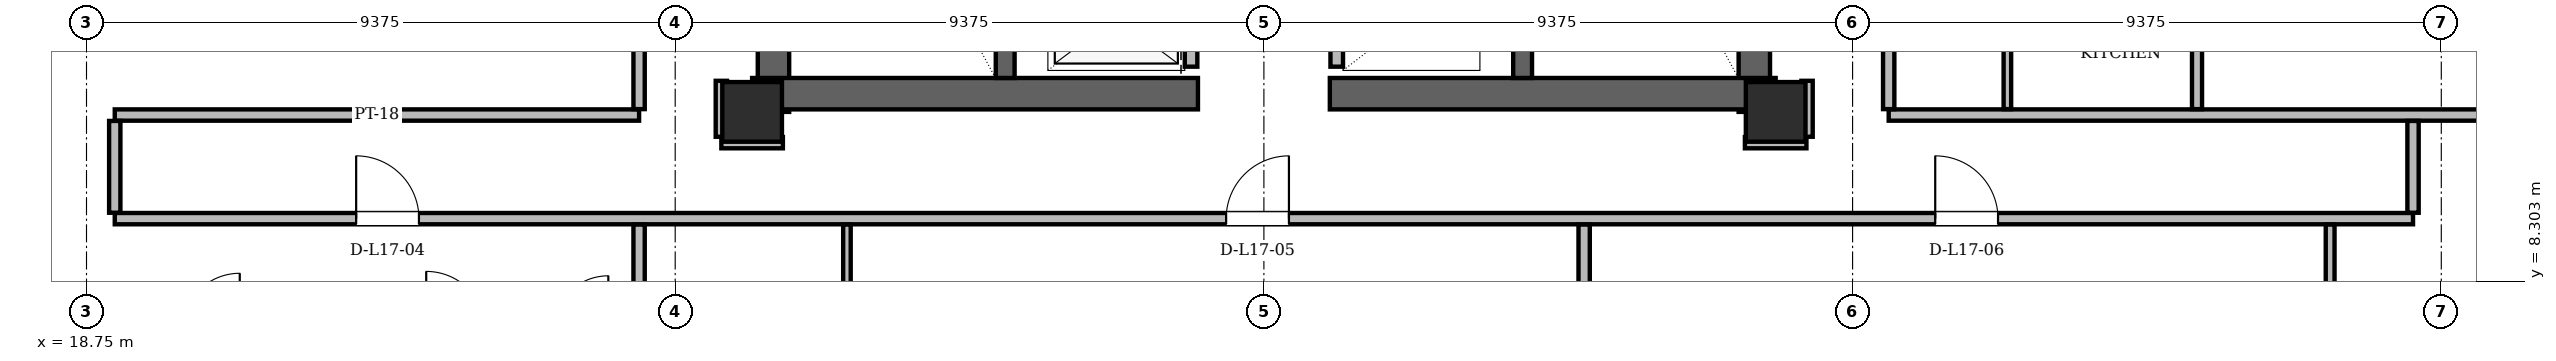
"""IFC4 building model, lengths in metres.
Left out: names, types, materials, properties, quantities, classifications, styles, units other than length and angle.
Written with IfcOpenShell. Run it as: python <this file> out.ifc"""

import sys

from ifc_helpers import new_model, si_unit, direction, frame, frame_2d, origin, origin_2d, place, context, subcontext, project, spatial, rectangle, hollow_rectangle, extrude, element, fill, save


model = new_model("IFC4")
c1 = context("Model", 3, precision=1e-05, world=origin(), true_north=direction((0.0, 1.0)))
c2 = subcontext(c1, "Body", "Model", "MODEL_VIEW")
j1 = project(units=[si_unit("LENGTHUNIT", "METRE"), si_unit("PLANEANGLEUNIT", "RADIAN")], contexts=[c1])
p1 = place(None, origin())
s1 = spatial("IfcSite", under=j1, at=p1, CompositionType="ELEMENT")
p2 = place(p1, origin())
s2 = spatial("IfcBuilding", under=s1, at=p2, CompositionType="ELEMENT")
p3 = place(p2, frame((0.0, 0.0, 66.9)))
s3 = spatial("IfcBuildingStorey", under=s2, at=p3, CompositionType="ELEMENT", Elevation=66.9)
for number, where, z_axis, x_axis in (
    (1, (29.35, 11.0, 0.0), (0.0, 0.0, 1.0), (1.0, 0.0, 0.0)),
    (2, (45.65, 11.0, 0.0), (0.0, 0.0, 1.0), (1.0, 0.0, 0.0)),
):
    element("IfcColumn", number, at=place(p3, frame(where, z_axis=z_axis, x_axis=x_axis)), inside=s3, PredefinedType="COLUMN", context=c2, shape_type="SweptSolid", body=[
        extrude(hollow_rectangle(XDim=0.95, YDim=0.95, WallThickness=0.08, at=origin_2d()), origin(), (0.0, 0.0, 1.0), 3.6),
    ])
for number, where, z_axis, x_axis in (
    (3, (29.69, 11.0, 0.0), (0.0, 0.0, 1.0), (0.0, 1.0, 0.0)),
    (4, (45.31, 11.0, 0.0), (0.0, 0.0, 1.0), (0.0, 1.0, 0.0)),
):
    element("IfcWall", number, at=place(p3, frame(where, z_axis=z_axis, x_axis=x_axis)), inside=s3, PredefinedType="SHEAR", context=c2, shape_type="SweptSolid", body=[
        extrude(rectangle(XDim=13.3, YDim=0.5, at=frame_2d((6.65, 0.0))), origin(), (0.0, 0.0, 1.0), 3.36),
    ])
for number, where, z_axis, x_axis in (
    (5, (29.35, 11.29, 0.0), (0.0, 0.0, 1.0), (1.0, 0.0, 0.0)),
    (6, (38.55, 11.29, 0.0), (0.0, 0.0, 1.0), (1.0, 0.0, 0.0)),
):
    element("IfcWall", number, at=place(p3, frame(where, z_axis=z_axis, x_axis=x_axis)), inside=s3, PredefinedType="SHEAR", context=c2, shape_type="SweptSolid", body=[
        extrude(rectangle(XDim=7.1, YDim=0.5, at=frame_2d((3.55, 0.0))), origin(), (0.0, 0.0, 1.0), 3.36),
    ])
for number, where, z_axis, x_axis in (
    (7, (33.38, 11.54, 0.0), (0.0, 0.0, 1.0), (0.0, 1.0, 0.0)),
    (8, (41.62, 11.54, 0.0), (0.0, 0.0, 1.0), (0.0, 1.0, 0.0)),
):
    element("IfcWall", number, at=place(p3, frame(where, z_axis=z_axis, x_axis=x_axis)), inside=s3, PredefinedType="SHEAR", context=c2, shape_type="SweptSolid", body=[
        extrude(rectangle(XDim=7.62, YDim=0.3, at=frame_2d((3.81, 0.0))), origin(), (0.0, 0.0, 1.0), 3.36),
    ])
p4 = place(p3, frame((13.788, 14.297, 0.0), z_axis=(0.0, 0.0, 1.0), x_axis=(0.499986980295, -0.866032920584, 0.0)))
e9 = element("IfcWall", 9, at=p4, inside=s3, PredefinedType="SOLIDWALL", context=c2, shape_type="SweptSolid", body=[
    extrude(rectangle(XDim=13.661, YDim=0.34, at=frame_2d((6.831, 0.0))), origin(), (0.0, 0.0, 1.0), 2.494),
])
p5 = place(p3, frame((54.382, 2.466, 0.0), z_axis=(0.0, 0.0, 1.0), x_axis=(0.499986980295, 0.866032920584, 0.0)))
e10 = element("IfcWall", 10, at=p5, inside=s3, PredefinedType="SOLIDWALL", context=c2, shape_type="SweptSolid", body=[
    extrude(rectangle(XDim=13.661, YDim=0.34, at=frame_2d((6.831, 0.0))), origin(), (0.0, 0.0, 1.0), 2.494),
])
p6 = place(p5, frame((8.587, 0.0, 0.85)))
e11 = element("IfcOpeningElement", 11, at=p6, cuts=e10, PredefinedType="OPENING", context=c2, shape_type="SweptSolid", body=[
    extrude(rectangle(XDim=1.2, YDim=1.48, at=frame_2d((0.6, 0.74))), frame((0.0, 0.17, 0.0), z_axis=(0.0, -1.0, 0.0), x_axis=(1.0, 0.0, 0.0)), (0.0, 0.0, 1.0), 0.34),
])
p7 = place(p3, frame((36.34, 11.72, 0.0), z_axis=(0.0, 0.0, 1.0), x_axis=(0.0, 1.0, 0.0)))
e12 = element("IfcWall", 12, at=p7, inside=s3, PredefinedType="PARTITIONING", context=c2, shape_type="SweptSolid", body=[
    extrude(rectangle(XDim=7.6, YDim=0.2, at=frame_2d((3.8, 0.0))), origin(), (0.0, 0.0, 1.0), 3.36),
])
p8 = place(p7, frame((0.255, 0.0, 0.0)))
e13 = element("IfcOpeningElement", 13, at=p8, cuts=e12, PredefinedType="OPENING", context=c2, shape_type="SweptSolid", body=[
    extrude(rectangle(XDim=1.05, YDim=2.15, at=frame_2d((0.525, 1.075))), frame((0.0, 0.1, 0.0), z_axis=(0.0, -1.0, 0.0), x_axis=(1.0, 0.0, 0.0)), (0.0, 0.0, 1.0), 0.2),
])
p9 = place(p7, frame((2.105, 0.0, 0.0)))
e14 = element("IfcOpeningElement", 14, at=p9, cuts=e12, PredefinedType="OPENING", context=c2, shape_type="SweptSolid", body=[
    extrude(rectangle(XDim=1.05, YDim=2.15, at=frame_2d((0.525, 1.075))), frame((0.0, 0.1, 0.0), z_axis=(0.0, -1.0, 0.0), x_axis=(1.0, 0.0, 0.0)), (0.0, 0.0, 1.0), 0.2),
])
p10 = place(p7, frame((3.955, 0.0, 0.0)))
e15 = element("IfcOpeningElement", 15, at=p10, cuts=e12, PredefinedType="OPENING", context=c2, shape_type="SweptSolid", body=[
    extrude(rectangle(XDim=1.05, YDim=2.15, at=frame_2d((0.525, 1.075))), frame((0.0, 0.1, 0.0), z_axis=(0.0, -1.0, 0.0), x_axis=(1.0, 0.0, 0.0)), (0.0, 0.0, 1.0), 0.2),
])
p11 = place(p3, frame((38.66, 11.72, 0.0), z_axis=(0.0, 0.0, 1.0), x_axis=(0.0, 1.0, 0.0)))
e16 = element("IfcWall", 16, at=p11, inside=s3, PredefinedType="PARTITIONING", context=c2, shape_type="SweptSolid", body=[
    extrude(rectangle(XDim=9.1, YDim=0.2, at=frame_2d((4.55, 0.0))), origin(), (0.0, 0.0, 1.0), 3.36),
])
p12 = place(p3, frame((19.2, 9.3, 0.0), z_axis=(0.0, 0.0, 1.0), x_axis=(1.0, 0.0, 0.0)))
e17 = element("IfcWall", 17, at=p12, inside=s3, PredefinedType="PARTITIONING", context=c2, shape_type="SweptSolid", body=[
    extrude(rectangle(XDim=36.6, YDim=0.18, at=frame_2d((18.3, 0.0))), origin(), (0.0, 0.0, 1.0), 2.738),
])
p13 = place(p12, frame((3.844, 0.0, 0.0)))
e18 = element("IfcOpeningElement", 18, at=p13, cuts=e17, PredefinedType="OPENING", context=c2, shape_type="SweptSolid", body=[
    extrude(rectangle(XDim=1.0, YDim=2.18, at=frame_2d((0.5, 1.09))), frame((0.0, 0.09, 0.0), z_axis=(0.0, -1.0, 0.0), x_axis=(1.0, 0.0, 0.0)), (0.0, 0.0, 1.0), 0.18),
])
p14 = place(p12, frame((17.699, 0.0, 0.0)))
e19 = element("IfcOpeningElement", 19, at=p14, cuts=e17, PredefinedType="OPENING", context=c2, shape_type="SweptSolid", body=[
    extrude(rectangle(XDim=1.0, YDim=2.18, at=frame_2d((0.5, 1.09))), frame((0.0, 0.09, 0.0), z_axis=(0.0, -1.0, 0.0), x_axis=(1.0, 0.0, 0.0)), (0.0, 0.0, 1.0), 0.18),
])
p15 = place(p12, frame((28.991, 0.0, 0.0)))
e20 = element("IfcOpeningElement", 20, at=p15, cuts=e17, PredefinedType="OPENING", context=c2, shape_type="SweptSolid", body=[
    extrude(rectangle(XDim=1.0, YDim=2.18, at=frame_2d((0.5, 1.09))), frame((0.0, 0.09, 0.0), z_axis=(0.0, -1.0, 0.0), x_axis=(1.0, 0.0, 0.0)), (0.0, 0.0, 1.0), 0.18),
])
for number, where, z_axis, x_axis in (
    (21, (28.86, 10.51, 0.0), (0.0, 0.0, 1.0), (1.0, 0.0, 0.0)),
    (22, (45.16, 10.51, 0.0), (0.0, 0.0, 1.0), (1.0, 0.0, 0.0)),
):
    element("IfcWall", number, at=place(p3, frame(where, z_axis=z_axis, x_axis=x_axis)), inside=s3, PredefinedType="PARTITIONING", context=c2, shape_type="SweptSolid", body=[
        extrude(rectangle(XDim=0.98, YDim=0.18, at=frame_2d((0.49, 0.0))), origin(), (0.0, 0.0, 1.0), 2.738),
    ])
p16 = place(p3, frame((19.2, 10.95, 0.0), z_axis=(0.0, 0.0, 1.0), x_axis=(1.0, 0.0, 0.0)))
e23 = element("IfcWall", 23, at=p16, inside=s3, PredefinedType="PARTITIONING", context=c2, shape_type="SweptSolid", body=[
    extrude(rectangle(XDim=8.35, YDim=0.18, at=frame_2d((4.175, 0.0))), origin(), (0.0, 0.0, 1.0), 3.36),
])
p17 = place(p3, frame((47.45, 10.95, 0.0), z_axis=(0.0, 0.0, 1.0), x_axis=(1.0, 0.0, 0.0)))
e24 = element("IfcWall", 24, at=p17, inside=s3, PredefinedType="PARTITIONING", context=c2, shape_type="SweptSolid", body=[
    extrude(rectangle(XDim=11.629, YDim=0.18, at=frame_2d((5.814, 0.0))), origin(), (0.0, 0.0, 1.0), 3.36),
])
p18 = place(p3, frame((19.2, 9.394, 0.0), z_axis=(0.0, 0.0, 1.0), x_axis=(0.0, 1.0, 0.0)))
e25 = element("IfcWall", 25, at=p18, inside=s3, PredefinedType="PARTITIONING", context=c2, shape_type="SweptSolid", body=[
    extrude(rectangle(XDim=1.462, YDim=0.18, at=frame_2d((0.731, 0.0))), origin(), (0.0, 0.0, 1.0), 3.36),
])
p19 = place(p3, frame((27.55, 2.64, 0.0), z_axis=(0.0, 0.0, 1.0), x_axis=(0.0, 1.0, 0.0)))
e26 = element("IfcWall", 26, at=p19, inside=s3, PredefinedType="PARTITIONING", context=c2, shape_type="SweptSolid", body=[
    extrude(rectangle(XDim=6.566, YDim=0.18, at=frame_2d((3.283, 0.0))), origin(), (0.0, 0.0, 1.0), 2.946),
])
p20 = place(p3, frame((27.55, 11.044, 0.0), z_axis=(0.0, 0.0, 1.0), x_axis=(0.0, 1.0, 0.0)))
e27 = element("IfcWall", 27, at=p20, inside=s3, PredefinedType="PARTITIONING", context=c2, shape_type="SweptSolid", body=[
    extrude(rectangle(XDim=26.742, YDim=0.18, at=frame_2d((13.371, 0.0))), origin(), (0.0, 0.0, 1.0), 2.494),
])
p21 = place(p20, frame((10.795, 0.0, 0.0)))
e28 = element("IfcOpeningElement", 28, at=p21, cuts=e27, PredefinedType="OPENING", context=c2, shape_type="SweptSolid", body=[
    extrude(rectangle(XDim=1.0, YDim=2.18, at=frame_2d((0.5, 1.09))), frame((0.0, 0.09, 0.0), z_axis=(0.0, -1.0, 0.0), x_axis=(1.0, 0.0, 0.0)), (0.0, 0.0, 1.0), 0.18),
])
p22 = place(p3, frame((28.86, 10.604, 0.0), z_axis=(0.0, 0.0, 1.0), x_axis=(0.0, 1.0, 0.0)))
e29 = element("IfcWall", 29, at=p22, inside=s3, PredefinedType="PARTITIONING", context=c2, shape_type="SweptSolid", body=[
    extrude(rectangle(XDim=0.891, YDim=0.18, at=frame_2d((0.446, 0.0))), origin(), (0.0, 0.0, 1.0), 2.738),
])
p23 = place(p3, frame((30.86, 2.734, 0.0), z_axis=(0.0, 0.0, 1.0), x_axis=(0.0, 1.0, 0.0)))
e30 = element("IfcWall", 30, at=p23, inside=s3, PredefinedType="PARTITIONING", context=c2, shape_type="SweptSolid", body=[
    extrude(rectangle(XDim=6.472, YDim=0.12, at=frame_2d((3.236, 0.0))), origin(), (0.0, 0.0, 1.0), 2.946),
])
p24 = place(p23, frame((2.784, 0.0, 0.0)))
e31 = element("IfcOpeningElement", 31, at=p24, cuts=e30, PredefinedType="OPENING", context=c2, shape_type="SweptSolid", body=[
    extrude(rectangle(XDim=0.88, YDim=2.08, at=frame_2d((0.44, 1.04))), frame((0.0, 0.06, 0.0), z_axis=(0.0, -1.0, 0.0), x_axis=(1.0, 0.0, 0.0)), (0.0, 0.0, 1.0), 0.12),
])
p25 = place(p3, frame((42.6, 2.64, 0.0), z_axis=(0.0, 0.0, 1.0), x_axis=(0.0, 1.0, 0.0)))
e32 = element("IfcWall", 32, at=p25, inside=s3, PredefinedType="PARTITIONING", context=c2, shape_type="SweptSolid", body=[
    extrude(rectangle(XDim=6.566, YDim=0.18, at=frame_2d((3.283, 0.0))), origin(), (0.0, 0.0, 1.0), 2.946),
])
p26 = place(p3, frame((46.15, 10.604, 0.0), z_axis=(0.0, 0.0, 1.0), x_axis=(0.0, 1.0, 0.0)))
e33 = element("IfcWall", 33, at=p26, inside=s3, PredefinedType="PARTITIONING", context=c2, shape_type="SweptSolid", body=[
    extrude(rectangle(XDim=0.891, YDim=0.18, at=frame_2d((0.446, 0.0))), origin(), (0.0, 0.0, 1.0), 2.738),
])
p27 = place(p3, frame((47.45, 11.044, 0.0), z_axis=(0.0, 0.0, 1.0), x_axis=(0.0, 1.0, 0.0)))
e34 = element("IfcWall", 34, at=p27, inside=s3, PredefinedType="PARTITIONING", context=c2, shape_type="SweptSolid", body=[
    extrude(rectangle(XDim=14.832, YDim=0.18, at=frame_2d((7.416, 0.0))), origin(), (0.0, 0.0, 1.0), 2.738),
])
p28 = place(p27, frame((6.079, 0.0, 0.0)))
e35 = element("IfcOpeningElement", 35, at=p28, cuts=e34, PredefinedType="OPENING", context=c2, shape_type="SweptSolid", body=[
    extrude(rectangle(XDim=1.0, YDim=2.18, at=frame_2d((0.5, 1.09))), frame((0.0, 0.09, 0.0), z_axis=(0.0, -1.0, 0.0), x_axis=(1.0, 0.0, 0.0)), (0.0, 0.0, 1.0), 0.18),
])
p29 = place(p27, frame((10.668, 0.0, 0.0)))
e36 = element("IfcOpeningElement", 36, at=p29, cuts=e34, PredefinedType="OPENING", context=c2, shape_type="SweptSolid", body=[
    extrude(rectangle(XDim=1.0, YDim=2.18, at=frame_2d((0.5, 1.09))), frame((0.0, 0.09, 0.0), z_axis=(0.0, -1.0, 0.0), x_axis=(1.0, 0.0, 0.0)), (0.0, 0.0, 1.0), 0.18),
])
p30 = place(p3, frame((49.34, 11.044, 0.0), z_axis=(0.0, 0.0, 1.0), x_axis=(0.0, 1.0, 0.0)))
e37 = element("IfcWall", 37, at=p30, inside=s3, PredefinedType="PARTITIONING", context=c2, shape_type="SweptSolid", body=[
    extrude(rectangle(XDim=3.102, YDim=0.12, at=frame_2d((1.551, 0.0))), origin(), (0.0, 0.0, 1.0), 2.738),
])
p31 = place(p3, frame((52.36, 11.044, 0.0), z_axis=(0.0, 0.0, 1.0), x_axis=(0.0, 1.0, 0.0)))
e38 = element("IfcWall", 38, at=p31, inside=s3, PredefinedType="PARTITIONING", context=c2, shape_type="SweptSolid", body=[
    extrude(rectangle(XDim=3.102, YDim=0.16, at=frame_2d((1.551, 0.0))), origin(), (0.0, 0.0, 1.0), 2.738),
])
p32 = place(p3, frame((54.48, 2.984, 0.0), z_axis=(0.0, 0.0, 1.0), x_axis=(0.0, 1.0, 0.0)))
e39 = element("IfcWall", 39, at=p32, inside=s3, PredefinedType="PARTITIONING", context=c2, shape_type="SweptSolid", body=[
    extrude(rectangle(XDim=6.222, YDim=0.14, at=frame_2d((3.111, 0.0))), origin(), (0.0, 0.0, 1.0), 3.36),
])
p33 = place(p32, frame((2.696, 0.0, 0.0)))
e40 = element("IfcOpeningElement", 40, at=p33, cuts=e39, PredefinedType="OPENING", context=c2, shape_type="SweptSolid", body=[
    extrude(rectangle(XDim=0.88, YDim=2.08, at=frame_2d((0.44, 1.04))), frame((0.0, 0.07, 0.0), z_axis=(0.0, -1.0, 0.0), x_axis=(1.0, 0.0, 0.0)), (0.0, 0.0, 1.0), 0.14),
])
p34 = place(p3, frame((55.8, 9.394, 0.0), z_axis=(0.0, 0.0, 1.0), x_axis=(0.0, 1.0, 0.0)))
e41 = element("IfcWall", 41, at=p34, inside=s3, PredefinedType="PARTITIONING", context=c2, shape_type="SweptSolid", body=[
    extrude(rectangle(XDim=1.462, YDim=0.18, at=frame_2d((0.731, 0.0))), origin(), (0.0, 0.0, 1.0), 3.36),
])
p35 = place(p13, origin())
e42 = element("IfcDoor", 42, at=p35, inside=s3, OperationType="SINGLE_SWING_LEFT", PredefinedType="DOOR", context=c2, shape_type="SweptSolid", body=[
    extrude(rectangle(XDim=1.0, YDim=2.18, at=frame_2d((0.5, 1.09))), frame((0.0, 0.025, 0.0), z_axis=(0.0, -1.0, 0.0), x_axis=(1.0, 0.0, 0.0)), (0.0, 0.0, 1.0), 0.05),
])
fill(e18, e42)
p36 = place(p14, origin())
e43 = element("IfcDoor", 43, at=p36, inside=s3, OperationType="SINGLE_SWING_RIGHT", PredefinedType="DOOR", context=c2, shape_type="SweptSolid", body=[
    extrude(rectangle(XDim=1.0, YDim=2.18, at=frame_2d((0.5, 1.09))), frame((0.0, 0.025, 0.0), z_axis=(0.0, -1.0, 0.0), x_axis=(1.0, 0.0, 0.0)), (0.0, 0.0, 1.0), 0.05),
])
fill(e19, e43)
p37 = place(p15, origin())
e44 = element("IfcDoor", 44, at=p37, inside=s3, OperationType="SINGLE_SWING_LEFT", PredefinedType="DOOR", context=c2, shape_type="SweptSolid", body=[
    extrude(rectangle(XDim=1.0, YDim=2.18, at=frame_2d((0.5, 1.09))), frame((0.0, 0.025, 0.0), z_axis=(0.0, -1.0, 0.0), x_axis=(1.0, 0.0, 0.0)), (0.0, 0.0, 1.0), 0.05),
])
fill(e20, e44)
save(model, sys.argv[1])
